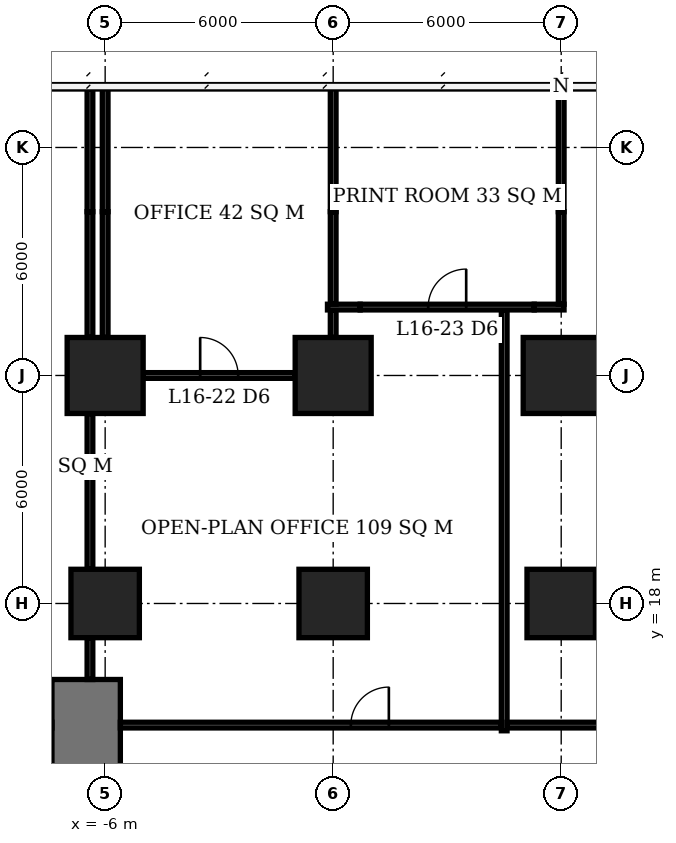
"""IFC4 building model, lengths in metres.
Left out: names, types, materials, properties, quantities, classifications, styles, units other than length and angle.
Written with IfcOpenShell. Run it as: python <this file> out.ifc"""

import sys

from ifc_helpers import new_model, si_unit, direction, frame, frame_2d, origin, origin_2d, place, context, subcontext, project, spatial, rectangle, extrude, element, fill, save


model = new_model("IFC4")
c1 = context("Model", 3, precision=1e-05, world=origin(), true_north=direction((0.0, 1.0)))
c2 = subcontext(c1, "Body", "Model", "MODEL_VIEW")
j1 = project(units=[si_unit("LENGTHUNIT", "METRE"), si_unit("PLANEANGLEUNIT", "RADIAN")], contexts=[c1])
p1 = place(None, origin())
s1 = spatial("IfcSite", under=j1, at=p1, CompositionType="ELEMENT")
p2 = place(p1, origin())
s2 = spatial("IfcBuilding", under=s1, at=p2, CompositionType="ELEMENT")
p3 = place(p2, frame((0.0, 0.0, 68.9)))
s3 = spatial("IfcBuildingStorey", under=s2, at=p3, CompositionType="ELEMENT", Elevation=68.9)
p4 = place(p3, frame((-6.0, 18.0, 0.0), z_axis=(0.0, 0.0, 1.0), x_axis=(1.0, 0.0, 0.0)))
e1 = element("IfcColumn", 1, at=p4, inside=s3, PredefinedType="COLUMN", context=c2, shape_type="SweptSolid", body=[
    extrude(rectangle(XDim=1.8, YDim=1.8, at=origin_2d()), origin(), (0.0, 0.0, 1.0), 3.9),
])
p5 = place(p3, frame((-6.0, 24.0, 0.0), z_axis=(0.0, 0.0, 1.0), x_axis=(1.0, 0.0, 0.0)))
e2 = element("IfcColumn", 2, at=p5, inside=s3, PredefinedType="COLUMN", context=c2, shape_type="SweptSolid", body=[
    extrude(rectangle(XDim=2.0, YDim=2.0, at=origin_2d()), origin(), (0.0, 0.0, 1.0), 3.9),
])
p6 = place(p3, frame((0.0, 18.0, 0.0), z_axis=(0.0, 0.0, 1.0), x_axis=(1.0, 0.0, 0.0)))
e3 = element("IfcColumn", 3, at=p6, inside=s3, PredefinedType="COLUMN", context=c2, shape_type="SweptSolid", body=[
    extrude(rectangle(XDim=1.8, YDim=1.8, at=origin_2d()), origin(), (0.0, 0.0, 1.0), 3.9),
])
p7 = place(p3, frame((0.0, 24.0, 0.0), z_axis=(0.0, 0.0, 1.0), x_axis=(1.0, 0.0, 0.0)))
e4 = element("IfcColumn", 4, at=p7, inside=s3, PredefinedType="COLUMN", context=c2, shape_type="SweptSolid", body=[
    extrude(rectangle(XDim=2.0, YDim=2.0, at=origin_2d()), origin(), (0.0, 0.0, 1.0), 3.9),
])
p8 = place(p3, frame((6.0, 18.0, 0.0), z_axis=(0.0, 0.0, 1.0), x_axis=(1.0, 0.0, 0.0)))
e5 = element("IfcColumn", 5, at=p8, inside=s3, PredefinedType="COLUMN", context=c2, shape_type="SweptSolid", body=[
    extrude(rectangle(XDim=1.8, YDim=1.8, at=origin_2d()), origin(), (0.0, 0.0, 1.0), 3.9),
])
p9 = place(p3, frame((6.0, 24.0, 0.0), z_axis=(0.0, 0.0, 1.0), x_axis=(1.0, 0.0, 0.0)))
e6 = element("IfcColumn", 6, at=p9, inside=s3, PredefinedType="COLUMN", context=c2, shape_type="SweptSolid", body=[
    extrude(rectangle(XDim=2.0, YDim=2.0, at=origin_2d()), origin(), (0.0, 0.0, 1.0), 3.9),
])
p10 = place(p3, frame((-6.5, 13.6, 0.0), z_axis=(0.0, 0.0, 1.0), x_axis=(0.0, 1.0, 0.0)))
e7 = element("IfcWall", 7, at=p10, inside=s3, PredefinedType="SHEAR", context=c2, shape_type="SweptSolid", body=[
    extrude(rectangle(XDim=2.4, YDim=1.8, at=frame_2d((1.2, 0.0))), origin(), (0.0, 0.0, 1.0), 3.9),
])
p11 = place(p3, frame((-5.0, 24.0, 0.0), z_axis=(0.0, 0.0, 1.0), x_axis=(1.0, 0.0, 0.0)))
e8 = element("IfcWall", 8, at=p11, inside=s3, PredefinedType="PARTITIONING", context=c2, shape_type="SweptSolid", body=[
    extrude(rectangle(XDim=4.0, YDim=0.15, at=frame_2d((2.0, 0.0))), origin(), (0.0, 0.0, 1.0), 3.65),
])
p12 = place(p11, frame((1.5, 0.0, 0.0)))
e9 = element("IfcOpeningElement", 9, at=p12, cuts=e8, PredefinedType="OPENING", context=c2, shape_type="SweptSolid", body=[
    extrude(rectangle(XDim=1.0, YDim=2.1, at=frame_2d((0.5, 1.05))), frame((0.0, 0.085, 0.0), z_axis=(0.0, -1.0, 0.0), x_axis=(1.0, 0.0, 0.0)), (0.0, 0.0, 1.0), 0.17),
])
p13 = place(p3, frame((-0.15, 25.8, 0.0), z_axis=(0.0, 0.0, 1.0), x_axis=(1.0, 0.0, 0.0)))
e10 = element("IfcWall", 10, at=p13, inside=s3, PredefinedType="PARTITIONING", context=c2, shape_type="SweptSolid", body=[
    extrude(rectangle(XDim=0.86, YDim=0.15, at=frame_2d((0.43, 0.0))), origin(), (0.0, 0.0, 1.0), 2.65),
])
p14 = place(p3, frame((0.71, 25.8, 0.0), z_axis=(0.0, 0.0, 1.0), x_axis=(1.0, 0.0, 0.0)))
e11 = element("IfcWall", 11, at=p14, inside=s3, PredefinedType="PARTITIONING", context=c2, shape_type="SweptSolid", body=[
    extrude(rectangle(XDim=4.58, YDim=0.15, at=frame_2d((2.29, 0.0))), origin(), (0.0, 0.0, 1.0), 3.65),
])
p15 = place(p14, frame((1.79, 0.0, 0.0)))
e12 = element("IfcOpeningElement", 12, at=p15, cuts=e11, PredefinedType="OPENING", context=c2, shape_type="SweptSolid", body=[
    extrude(rectangle(XDim=1.0, YDim=2.1, at=frame_2d((0.5, 1.05))), frame((0.0, 0.085, 0.0), z_axis=(0.0, -1.0, 0.0), x_axis=(1.0, 0.0, 0.0)), (0.0, 0.0, 1.0), 0.17),
])
p16 = place(p3, frame((5.29, 25.8, 0.0), z_axis=(0.0, 0.0, 1.0), x_axis=(1.0, 0.0, 0.0)))
e13 = element("IfcWall", 13, at=p16, inside=s3, PredefinedType="PARTITIONING", context=c2, shape_type="SweptSolid", body=[
    extrude(rectangle(XDim=0.785, YDim=0.15, at=frame_2d((0.393, 0.0))), origin(), (0.0, 0.0, 1.0), 2.65),
])
p17 = place(p3, frame((-6.0, 25.0, 0.0), z_axis=(0.0, 0.0, 1.0), x_axis=(0.0, 1.0, 0.0)))
e14 = element("IfcWall", 14, at=p17, inside=s3, PredefinedType="PARTITIONING", context=c2, shape_type="SweptSolid", body=[
    extrude(rectangle(XDim=3.31, YDim=0.15, at=frame_2d((1.655, 0.0))), origin(), (0.0, 0.0, 1.0), 2.65),
])
p18 = place(p3, frame((-6.0, 28.31, 0.0), z_axis=(0.0, 0.0, 1.0), x_axis=(0.0, 1.0, 0.0)))
e15 = element("IfcWall", 15, at=p18, inside=s3, PredefinedType="PARTITIONING", context=c2, shape_type="SweptSolid", body=[
    extrude(rectangle(XDim=3.29, YDim=0.15, at=frame_2d((1.645, 0.0))), origin(), (0.0, 0.0, 1.0), 3.65),
])
p19 = place(p3, frame((0.0, 25.0, 0.0), z_axis=(0.0, 0.0, 1.0), x_axis=(0.0, 1.0, 0.0)))
e16 = element("IfcWall", 16, at=p19, inside=s3, PredefinedType="PARTITIONING", context=c2, shape_type="SweptSolid", body=[
    extrude(rectangle(XDim=0.725, YDim=0.15, at=frame_2d((0.363, 0.0))), origin(), (0.0, 0.0, 1.0), 2.65),
])
p20 = place(p3, frame((0.0, 25.875, 0.0), z_axis=(0.0, 0.0, 1.0), x_axis=(0.0, 1.0, 0.0)))
e17 = element("IfcWall", 17, at=p20, inside=s3, PredefinedType="PARTITIONING", context=c2, shape_type="SweptSolid", body=[
    extrude(rectangle(XDim=2.435, YDim=0.15, at=frame_2d((1.218, 0.0))), origin(), (0.0, 0.0, 1.0), 2.65),
])
p21 = place(p3, frame((0.0, 28.31, 0.0), z_axis=(0.0, 0.0, 1.0), x_axis=(0.0, 1.0, 0.0)))
e18 = element("IfcWall", 18, at=p21, inside=s3, PredefinedType="PARTITIONING", context=c2, shape_type="SweptSolid", body=[
    extrude(rectangle(XDim=3.29, YDim=0.15, at=frame_2d((1.645, 0.0))), origin(), (0.0, 0.0, 1.0), 3.65),
])
p22 = place(p3, frame((6.0, 25.875, 0.0), z_axis=(0.0, 0.0, 1.0), x_axis=(0.0, 1.0, 0.0)))
e19 = element("IfcWall", 19, at=p22, inside=s3, PredefinedType="PARTITIONING", context=c2, shape_type="SweptSolid", body=[
    extrude(rectangle(XDim=2.435, YDim=0.15, at=frame_2d((1.218, 0.0))), origin(), (0.0, 0.0, 1.0), 2.65),
])
p23 = place(p3, frame((6.0, 28.31, 0.0), z_axis=(0.0, 0.0, 1.0), x_axis=(0.0, 1.0, 0.0)))
e20 = element("IfcWall", 20, at=p23, inside=s3, PredefinedType="PARTITIONING", context=c2, shape_type="SweptSolid", body=[
    extrude(rectangle(XDim=3.24, YDim=0.15, at=frame_2d((1.62, 0.0))), origin(), (0.0, 0.0, 1.0), 3.65),
])
p24 = place(p3, frame((-6.4, 16.0, 0.0), z_axis=(0.0, 0.0, 1.0), x_axis=(0.0, 1.0, 0.0)))
e21 = element("IfcWall", 21, at=p24, inside=s3, PredefinedType="PARTITIONING", context=c2, shape_type="SweptSolid", body=[
    extrude(rectangle(XDim=1.1, YDim=0.15, at=frame_2d((0.55, 0.0))), origin(), (0.0, 0.0, 1.0), 3.65),
])
p25 = place(p3, frame((-6.4, 18.9, 0.0), z_axis=(0.0, 0.0, 1.0), x_axis=(0.0, 1.0, 0.0)))
e22 = element("IfcWall", 22, at=p25, inside=s3, PredefinedType="PARTITIONING", context=c2, shape_type="SweptSolid", body=[
    extrude(rectangle(XDim=4.1, YDim=0.15, at=frame_2d((2.05, 0.0))), origin(), (0.0, 0.0, 1.0), 3.65),
])
p26 = place(p3, frame((-6.4, 25.0, 0.0), z_axis=(0.0, 0.0, 1.0), x_axis=(0.0, 1.0, 0.0)))
e23 = element("IfcWall", 23, at=p26, inside=s3, PredefinedType="PARTITIONING", context=c2, shape_type="SweptSolid", body=[
    extrude(rectangle(XDim=3.31, YDim=0.15, at=frame_2d((1.655, 0.0))), origin(), (0.0, 0.0, 1.0), 2.65),
])
p27 = place(p3, frame((-6.4, 28.31, 0.0), z_axis=(0.0, 0.0, 1.0), x_axis=(0.0, 1.0, 0.0)))
e24 = element("IfcWall", 24, at=p27, inside=s3, PredefinedType="PARTITIONING", context=c2, shape_type="SweptSolid", body=[
    extrude(rectangle(XDim=3.24, YDim=0.15, at=frame_2d((1.62, 0.0))), origin(), (0.0, 0.0, 1.0), 3.65),
])
p28 = place(p3, frame((-5.6, 14.8, 0.0), z_axis=(0.0, 0.0, 1.0), x_axis=(1.0, 0.0, 0.0)))
e25 = element("IfcWall", 25, at=p28, inside=s3, PredefinedType="PARTITIONING", context=c2, shape_type="SweptSolid", body=[
    extrude(rectangle(XDim=10.025, YDim=0.15, at=frame_2d((5.013, 0.0))), origin(), (0.0, 0.0, 1.0), 3.65),
])
p29 = place(p28, frame((6.065, 0.0, 0.0)))
e26 = element("IfcOpeningElement", 26, at=p29, cuts=e25, PredefinedType="OPENING", context=c2, shape_type="SweptSolid", body=[
    extrude(rectangle(XDim=1.0, YDim=2.1, at=frame_2d((0.5, 1.05))), frame((0.0, 0.085, 0.0), z_axis=(0.0, -1.0, 0.0), x_axis=(1.0, 0.0, 0.0)), (0.0, 0.0, 1.0), 0.17),
])
p30 = place(p3, frame((4.5, 14.65, 0.0), z_axis=(0.0, 0.0, 1.0), x_axis=(0.0, 1.0, 0.0)))
e27 = element("IfcWall", 27, at=p30, inside=s3, PredefinedType="PARTITIONING", context=c2, shape_type="SweptSolid", body=[
    extrude(rectangle(XDim=11.075, YDim=0.15, at=frame_2d((5.538, 0.0))), origin(), (0.0, 0.0, 1.0), 3.65),
])
p31 = place(p3, frame((4.575, 14.8, 0.0), z_axis=(0.0, 0.0, 1.0), x_axis=(1.0, 0.0, 0.0)))
e28 = element("IfcWall", 28, at=p31, inside=s3, PredefinedType="PARTITIONING", context=c2, shape_type="SweptSolid", body=[
    extrude(rectangle(XDim=13.025, YDim=0.15, at=frame_2d((6.513, 0.0))), origin(), (0.0, 0.0, 1.0), 3.65),
])
p32 = place(p31, frame((7.94, 0.0, 0.0)))
e29 = element("IfcOpeningElement", 29, at=p32, cuts=e28, PredefinedType="OPENING", context=c2, shape_type="SweptSolid", body=[
    extrude(rectangle(XDim=1.0, YDim=2.1, at=frame_2d((0.5, 1.05))), frame((0.0, 0.085, 0.0), z_axis=(0.0, -1.0, 0.0), x_axis=(1.0, 0.0, 0.0)), (0.0, 0.0, 1.0), 0.17),
])
p33 = place(p12, origin())
e30 = element("IfcDoor", 30, at=p33, inside=s3, OperationType="SINGLE_SWING_LEFT", PredefinedType="DOOR", context=c2, shape_type="SweptSolid", body=[
    extrude(rectangle(XDim=1.0, YDim=2.1, at=frame_2d((0.5, 1.05))), frame((0.0, 0.025, 0.0), z_axis=(0.0, -1.0, 0.0), x_axis=(1.0, 0.0, 0.0)), (0.0, 0.0, 1.0), 0.05),
])
fill(e9, e30)
p34 = place(p15, origin())
e31 = element("IfcDoor", 31, at=p34, inside=s3, OperationType="SINGLE_SWING_RIGHT", PredefinedType="DOOR", context=c2, shape_type="SweptSolid", body=[
    extrude(rectangle(XDim=1.0, YDim=2.1, at=frame_2d((0.5, 1.05))), frame((0.0, 0.025, 0.0), z_axis=(0.0, -1.0, 0.0), x_axis=(1.0, 0.0, 0.0)), (0.0, 0.0, 1.0), 0.05),
])
fill(e12, e31)
p35 = place(p29, origin())
e32 = element("IfcDoor", 32, at=p35, inside=s3, OperationType="SINGLE_SWING_RIGHT", PredefinedType="DOOR", context=c2, shape_type="SweptSolid", body=[
    extrude(rectangle(XDim=1.0, YDim=2.1, at=frame_2d((0.5, 1.05))), frame((0.0, 0.025, 0.0), z_axis=(0.0, -1.0, 0.0), x_axis=(1.0, 0.0, 0.0)), (0.0, 0.0, 1.0), 0.05),
])
fill(e26, e32)
save(model, sys.argv[1])
